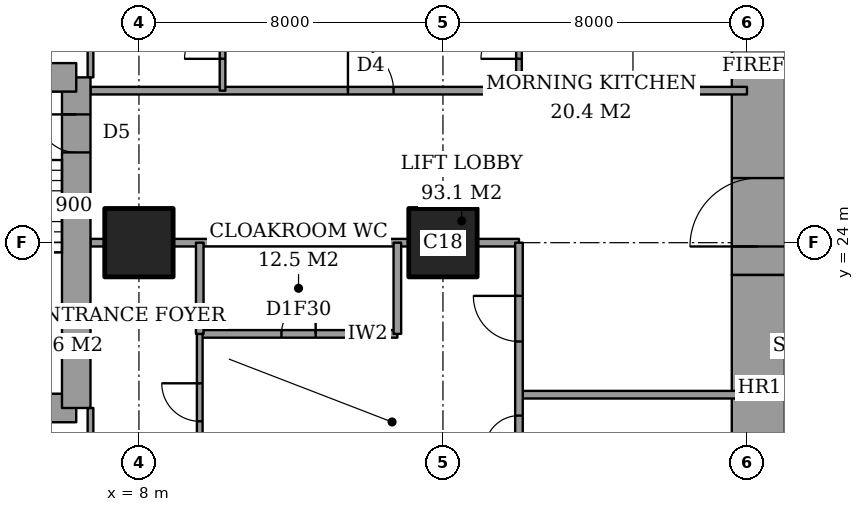
"""IFC4 building model, lengths in metres.
Left out: names, types, materials, properties, quantities, classifications, styles, units other than length and angle.
Written with IfcOpenShell. Run it as: python <this file> out.ifc"""

import sys

from ifc_helpers import new_model, si_unit, direction, frame, frame_2d, origin, origin_2d, place, context, subcontext, project, spatial, rectangle, extrude, element, fill, save


model = new_model("IFC4")
c1 = context("Model", 3, precision=1e-05, world=origin(), true_north=direction((0.0, 1.0)))
c2 = subcontext(c1, "Body", "Model", "MODEL_VIEW")
j1 = project(units=[si_unit("LENGTHUNIT", "METRE"), si_unit("PLANEANGLEUNIT", "RADIAN")], contexts=[c1])
p1 = place(None, origin())
s1 = spatial("IfcSite", under=j1, at=p1, CompositionType="ELEMENT")
p2 = place(p1, origin())
s2 = spatial("IfcBuilding", under=s1, at=p2, CompositionType="ELEMENT")
p3 = place(p2, frame((0.0, 0.0, 214.6)))
s3 = spatial("IfcBuildingStorey", under=s2, at=p3, CompositionType="ELEMENT", Elevation=214.6)
for number, where, z_axis, x_axis in (
    (1, (8.0, 24.0, 0.0), (0.0, 0.0, 1.0), (1.0, 0.0, 0.0)),
    (2, (16.0, 24.0, 0.0), (0.0, 0.0, 1.0), (1.0, 0.0, 0.0)),
):
    element("IfcColumn", number, at=place(p3, frame(where, z_axis=z_axis, x_axis=x_axis)), inside=s3, PredefinedType="COLUMN", context=c2, shape_type="SweptSolid", body=[
        extrude(rectangle(XDim=1.8, YDim=1.8, at=origin_2d()), origin(), (0.0, 0.0, 1.0), 3.6),
    ])
p4 = place(p3, frame((24.3, 13.0, 0.0), z_axis=(0.0, 0.0, 1.0), x_axis=(0.0, 1.0, 0.0)))
e3 = element("IfcWall", 3, at=p4, inside=s3, PredefinedType="SHEAR", context=c2, shape_type="SweptSolid", body=[
    extrude(rectangle(XDim=10.15, YDim=1.4, at=frame_2d((5.075, 0.0))), origin(), (0.0, 0.0, 1.0), 3.6),
])
p5 = place(p3, frame((24.3, 23.15, 0.0), z_axis=(0.0, 0.0, 1.0), x_axis=(0.0, 1.0, 0.0)))
e4 = element("IfcWall", 4, at=p5, inside=s3, PredefinedType="SHEAR", context=c2, shape_type="SweptSolid", body=[
    extrude(rectangle(XDim=11.85, YDim=1.4, at=frame_2d((5.925, 0.0))), origin(), (0.0, 0.0, 1.0), 3.6),
])
p6 = place(p5, frame((0.75, 0.0, 0.0)))
e5 = element("IfcOpeningElement", 5, at=p6, cuts=e4, PredefinedType="OPENING", context=c2, shape_type="SweptSolid", body=[
    extrude(rectangle(XDim=1.8, YDim=2.4, at=frame_2d((0.9, 1.2))), frame((0.0, 0.71, 0.0), z_axis=(0.0, -1.0, 0.0), x_axis=(1.0, 0.0, 0.0)), (0.0, 0.0, 1.0), 1.42),
])
p7 = place(p3, frame((1.9, 19.65, 0.0), z_axis=(0.0, 0.0, 1.0), x_axis=(1.0, 0.0, 0.0)))
e6 = element("IfcWall", 6, at=p7, inside=s3, PredefinedType="SHEAR", context=c2, shape_type="SweptSolid", body=[
    extrude(rectangle(XDim=4.45, YDim=0.75, at=frame_2d((2.225, 0.0))), origin(), (0.0, 0.0, 1.0), 3.6),
])
p8 = place(p3, frame((6.35, 19.65, 0.0), z_axis=(0.0, 0.0, 1.0), x_axis=(0.0, 1.0, 0.0)))
e7 = element("IfcWall", 7, at=p8, inside=s3, PredefinedType="SHEAR", context=c2, shape_type="SweptSolid", body=[
    extrude(rectangle(XDim=8.7, YDim=0.75, at=frame_2d((4.35, 0.0))), origin(), (0.0, 0.0, 1.0), 3.6),
])
p9 = place(p8, frame((6.725, 0.0, 0.0)))
e8 = element("IfcOpeningElement", 8, at=p9, cuts=e7, PredefinedType="OPENING", context=c2, shape_type="SweptSolid", body=[
    extrude(rectangle(XDim=1.0, YDim=2.1, at=frame_2d((0.5, 1.05))), frame((0.0, 0.385, 0.0), z_axis=(0.0, -1.0, 0.0), x_axis=(1.0, 0.0, 0.0)), (0.0, 0.0, 1.0), 0.77),
])
p10 = place(p3, frame((6.35, 28.35, 0.0), z_axis=(0.0, 0.0, 1.0), x_axis=(-1.0, 0.0, 0.0)))
e9 = element("IfcWall", 9, at=p10, inside=s3, PredefinedType="SHEAR", context=c2, shape_type="SweptSolid", body=[
    extrude(rectangle(XDim=4.45, YDim=0.75, at=frame_2d((2.225, 0.0))), origin(), (0.0, 0.0, 1.0), 3.6),
])
p11 = place(p3, frame((18.0, 20.0, 0.0), z_axis=(0.0, 0.0, 1.0), x_axis=(1.0, 0.0, 0.0)))
e10 = element("IfcWall", 10, at=p11, inside=s3, PredefinedType="PARTITIONING", context=c2, shape_type="SweptSolid", body=[
    extrude(rectangle(XDim=6.0, YDim=0.2, at=frame_2d((3.0, 0.0))), origin(), (0.0, 0.0, 1.0), 3.35),
])
p12 = place(p3, frame((9.6, 21.6, 0.0), z_axis=(0.0, 0.0, 1.0), x_axis=(1.0, 0.0, 0.0)))
e11 = element("IfcWall", 11, at=p12, inside=s3, PredefinedType="PARTITIONING", context=c2, shape_type="SweptSolid", body=[
    extrude(rectangle(XDim=5.2, YDim=0.2, at=frame_2d((2.6, 0.0))), origin(), (0.0, 0.0, 1.0), 3.35),
])
p13 = place(p12, frame((2.15, 0.0, 0.0)))
e12 = element("IfcOpeningElement", 12, at=p13, cuts=e11, PredefinedType="OPENING", context=c2, shape_type="SweptSolid", body=[
    extrude(rectangle(XDim=0.9, YDim=2.1, at=frame_2d((0.45, 1.05))), frame((0.0, 0.11, 0.0), z_axis=(0.0, -1.0, 0.0), x_axis=(1.0, 0.0, 0.0)), (0.0, 0.0, 1.0), 0.22),
])
p14 = place(p3, frame((6.725, 24.0, 0.0), z_axis=(0.0, 0.0, 1.0), x_axis=(1.0, 0.0, 0.0)))
e13 = element("IfcWall", 13, at=p14, inside=s3, PredefinedType="PARTITIONING", context=c2, shape_type="SweptSolid", body=[
    extrude(rectangle(XDim=0.375, YDim=0.2, at=frame_2d((0.188, 0.0))), origin(), (0.0, 0.0, 1.0), 3.35),
])
p15 = place(p3, frame((8.9, 24.0, 0.0), z_axis=(0.0, 0.0, 1.0), x_axis=(1.0, 0.0, 0.0)))
e14 = element("IfcWall", 14, at=p15, inside=s3, PredefinedType="PARTITIONING", context=c2, shape_type="SweptSolid", body=[
    extrude(rectangle(XDim=6.2, YDim=0.2, at=frame_2d((3.1, 0.0))), origin(), (0.0, 0.0, 1.0), 3.35),
])
p16 = place(p3, frame((16.9, 24.0, 0.0), z_axis=(0.0, 0.0, 1.0), x_axis=(1.0, 0.0, 0.0)))
e15 = element("IfcWall", 15, at=p16, inside=s3, PredefinedType="PARTITIONING", context=c2, shape_type="SweptSolid", body=[
    extrude(rectangle(XDim=1.1, YDim=0.2, at=frame_2d((0.55, 0.0))), origin(), (0.0, 0.0, 1.0), 3.35),
])
p17 = place(p3, frame((6.725, 28.0, 0.0), z_axis=(0.0, 0.0, 1.0), x_axis=(1.0, 0.0, 0.0)))
e16 = element("IfcWall", 16, at=p17, inside=s3, PredefinedType="PARTITIONING", context=c2, shape_type="SweptSolid", body=[
    extrude(rectangle(XDim=17.275, YDim=0.2, at=frame_2d((8.637, 0.0))), origin(), (0.0, 0.0, 1.0), 3.35),
])
p18 = place(p17, frame((6.775, 0.0, 0.0)))
e17 = element("IfcOpeningElement", 17, at=p18, cuts=e16, PredefinedType="OPENING", context=c2, shape_type="SweptSolid", body=[
    extrude(rectangle(XDim=1.2, YDim=2.4, at=frame_2d((0.6, 1.2))), frame((0.0, 0.11, 0.0), z_axis=(0.0, -1.0, 0.0), x_axis=(1.0, 0.0, 0.0)), (0.0, 0.0, 1.0), 0.22),
])
p19 = place(p3, frame((6.725, 17.2, 0.0), z_axis=(0.0, 0.0, 1.0), x_axis=(0.0, 1.0, 0.0)))
e18 = element("IfcWall", 18, at=p19, inside=s3, PredefinedType="PARTITIONING", context=c2, shape_type="SweptSolid", body=[
    extrude(rectangle(XDim=2.45, YDim=0.15, at=frame_2d((1.225, 0.0))), origin(), (0.0, 0.0, 1.0), 3.35),
])
p20 = place(p19, frame((0.587, 0.0, 0.0)))
e19 = element("IfcOpeningElement", 19, at=p20, cuts=e18, PredefinedType="OPENING", context=c2, shape_type="SweptSolid", body=[
    extrude(rectangle(XDim=0.9, YDim=2.1, at=frame_2d((0.45, 1.05))), frame((0.0, 0.085, 0.0), z_axis=(0.0, -1.0, 0.0), x_axis=(1.0, 0.0, 0.0)), (0.0, 0.0, 1.0), 0.17),
])
p21 = place(p3, frame((6.725, 28.35, 0.0), z_axis=(0.0, 0.0, 1.0), x_axis=(0.0, 1.0, 0.0)))
e20 = element("IfcWall", 20, at=p21, inside=s3, PredefinedType="PARTITIONING", context=c2, shape_type="SweptSolid", body=[
    extrude(rectangle(XDim=2.45, YDim=0.15, at=frame_2d((1.225, 0.0))), origin(), (0.0, 0.0, 1.0), 3.35),
])
p22 = place(p21, frame((0.962, 0.0, 0.0)))
e21 = element("IfcOpeningElement", 21, at=p22, cuts=e20, PredefinedType="OPENING", context=c2, shape_type="SweptSolid", body=[
    extrude(rectangle(XDim=0.9, YDim=2.1, at=frame_2d((0.45, 1.05))), frame((0.0, 0.085, 0.0), z_axis=(0.0, -1.0, 0.0), x_axis=(1.0, 0.0, 0.0)), (0.0, 0.0, 1.0), 0.17),
])
p23 = place(p3, frame((9.6, 21.6, 0.0), z_axis=(0.0, 0.0, 1.0), x_axis=(0.0, 1.0, 0.0)))
e22 = element("IfcWall", 22, at=p23, inside=s3, PredefinedType="PARTITIONING", context=c2, shape_type="SweptSolid", body=[
    extrude(rectangle(XDim=2.4, YDim=0.2, at=frame_2d((1.2, 0.0))), origin(), (0.0, 0.0, 1.0), 3.35),
])
p24 = place(p3, frame((9.6, 10.6, 0.0), z_axis=(0.0, 0.0, 1.0), x_axis=(0.0, 1.0, 0.0)))
e23 = element("IfcWall", 23, at=p24, inside=s3, PredefinedType="PARTITIONING", context=c2, shape_type="SweptSolid", body=[
    extrude(rectangle(XDim=11.0, YDim=0.15, at=frame_2d((5.5, 0.0))), origin(), (0.0, 0.0, 1.0), 3.35),
])
p25 = place(p24, frame((8.7, 0.0, 0.0)))
e24 = element("IfcOpeningElement", 24, at=p25, cuts=e23, PredefinedType="OPENING", context=c2, shape_type="SweptSolid", body=[
    extrude(rectangle(XDim=1.0, YDim=2.1, at=frame_2d((0.5, 1.05))), frame((0.0, 0.085, 0.0), z_axis=(0.0, -1.0, 0.0), x_axis=(1.0, 0.0, 0.0)), (0.0, 0.0, 1.0), 0.17),
])
p26 = place(p3, frame((10.2, 28.0, 0.0), z_axis=(0.0, 0.0, 1.0), x_axis=(0.0, 1.0, 0.0)))
e25 = element("IfcWall", 25, at=p26, inside=s3, PredefinedType="PARTITIONING", context=c2, shape_type="SweptSolid", body=[
    extrude(rectangle(XDim=9.4, YDim=0.15, at=frame_2d((4.7, 0.0))), origin(), (0.0, 0.0, 1.0), 3.35),
])
p27 = place(p26, frame((0.837, 0.0, 0.0)))
e26 = element("IfcOpeningElement", 26, at=p27, cuts=e25, PredefinedType="OPENING", context=c2, shape_type="SweptSolid", body=[
    extrude(rectangle(XDim=1.0, YDim=2.1, at=frame_2d((0.5, 1.05))), frame((0.0, 0.085, 0.0), z_axis=(0.0, -1.0, 0.0), x_axis=(1.0, 0.0, 0.0)), (0.0, 0.0, 1.0), 0.17),
])
p28 = place(p3, frame((14.8, 21.6, 0.0), z_axis=(0.0, 0.0, 1.0), x_axis=(0.0, 1.0, 0.0)))
e27 = element("IfcWall", 27, at=p28, inside=s3, PredefinedType="PARTITIONING", context=c2, shape_type="SweptSolid", body=[
    extrude(rectangle(XDim=2.4, YDim=0.2, at=frame_2d((1.2, 0.0))), origin(), (0.0, 0.0, 1.0), 3.35),
])
p29 = place(p3, frame((18.0, 18.0, 0.0), z_axis=(0.0, 0.0, 1.0), x_axis=(0.0, 1.0, 0.0)))
e28 = element("IfcWall", 28, at=p29, inside=s3, PredefinedType="PARTITIONING", context=c2, shape_type="SweptSolid", body=[
    extrude(rectangle(XDim=6.0, YDim=0.2, at=frame_2d((3.0, 0.0))), origin(), (0.0, 0.0, 1.0), 3.35),
])
p30 = place(p29, frame((3.4, 0.0, 0.0)))
e29 = element("IfcOpeningElement", 29, at=p30, cuts=e28, PredefinedType="OPENING", context=c2, shape_type="SweptSolid", body=[
    extrude(rectangle(XDim=1.2, YDim=2.4, at=frame_2d((0.6, 1.2))), frame((0.0, 0.11, 0.0), z_axis=(0.0, -1.0, 0.0), x_axis=(1.0, 0.0, 0.0)), (0.0, 0.0, 1.0), 0.22),
])
p31 = place(p29, frame((0.55, 0.0, 0.0)))
e30 = element("IfcOpeningElement", 30, at=p31, cuts=e28, PredefinedType="OPENING", context=c2, shape_type="SweptSolid", body=[
    extrude(rectangle(XDim=0.9, YDim=2.1, at=frame_2d((0.45, 1.05))), frame((0.0, 0.11, 0.0), z_axis=(0.0, -1.0, 0.0), x_axis=(1.0, 0.0, 0.0)), (0.0, 0.0, 1.0), 0.22),
])
p32 = place(p3, frame((18.0, 28.0, 0.0), z_axis=(0.0, 0.0, 1.0), x_axis=(0.0, 1.0, 0.0)))
e31 = element("IfcWall", 31, at=p32, inside=s3, PredefinedType="PARTITIONING", context=c2, shape_type="SweptSolid", body=[
    extrude(rectangle(XDim=9.4, YDim=0.15, at=frame_2d((4.7, 0.0))), origin(), (0.0, 0.0, 1.0), 3.35),
])
p33 = place(p32, frame((0.837, 0.0, 0.0)))
e32 = element("IfcOpeningElement", 32, at=p33, cuts=e31, PredefinedType="OPENING", context=c2, shape_type="SweptSolid", body=[
    extrude(rectangle(XDim=1.0, YDim=2.1, at=frame_2d((0.5, 1.05))), frame((0.0, 0.085, 0.0), z_axis=(0.0, -1.0, 0.0), x_axis=(1.0, 0.0, 0.0)), (0.0, 0.0, 1.0), 0.17),
])
p34 = place(p25, origin())
e33 = element("IfcDoor", 33, at=p34, inside=s3, OperationType="SINGLE_SWING_LEFT", PredefinedType="DOOR", context=c2, shape_type="SweptSolid", body=[
    extrude(rectangle(XDim=1.0, YDim=2.1, at=frame_2d((0.5, 1.05))), frame((0.0, 0.025, 0.0), z_axis=(0.0, -1.0, 0.0), x_axis=(1.0, 0.0, 0.0)), (0.0, 0.0, 1.0), 0.05),
])
fill(e24, e33)
p35 = place(p13, origin())
e34 = element("IfcDoor", 34, at=p35, inside=s3, OperationType="SINGLE_SWING_LEFT", PredefinedType="DOOR", context=c2, shape_type="SweptSolid", body=[
    extrude(rectangle(XDim=0.9, YDim=2.1, at=frame_2d((0.45, 1.05))), frame((0.0, 0.025, 0.0), z_axis=(0.0, -1.0, 0.0), x_axis=(1.0, 0.0, 0.0)), (0.0, 0.0, 1.0), 0.05),
])
fill(e12, e34)
p36 = place(p30, origin())
e35 = element("IfcDoor", 35, at=p36, inside=s3, OperationType="SINGLE_SWING_LEFT", PredefinedType="DOOR", context=c2, shape_type="SweptSolid", body=[
    extrude(rectangle(XDim=1.2, YDim=2.4, at=frame_2d((0.6, 1.2))), frame((0.0, 0.025, 0.0), z_axis=(0.0, -1.0, 0.0), x_axis=(1.0, 0.0, 0.0)), (0.0, 0.0, 1.0), 0.05),
])
fill(e29, e35)
p37 = place(p31, origin())
e36 = element("IfcDoor", 36, at=p37, inside=s3, OperationType="SINGLE_SWING_RIGHT", PredefinedType="DOOR", context=c2, shape_type="SweptSolid", body=[
    extrude(rectangle(XDim=0.9, YDim=2.1, at=frame_2d((0.45, 1.05))), frame((0.0, 0.025, 0.0), z_axis=(0.0, -1.0, 0.0), x_axis=(1.0, 0.0, 0.0)), (0.0, 0.0, 1.0), 0.05),
])
fill(e30, e36)
p38 = place(p27, origin())
e37 = element("IfcDoor", 37, at=p38, inside=s3, OperationType="SINGLE_SWING_RIGHT", PredefinedType="DOOR", context=c2, shape_type="SweptSolid", body=[
    extrude(rectangle(XDim=1.0, YDim=2.1, at=frame_2d((0.5, 1.05))), frame((0.0, 0.025, 0.0), z_axis=(0.0, -1.0, 0.0), x_axis=(1.0, 0.0, 0.0)), (0.0, 0.0, 1.0), 0.05),
])
fill(e26, e37)
p39 = place(p18, origin())
e38 = element("IfcDoor", 38, at=p39, inside=s3, OperationType="SINGLE_SWING_RIGHT", PredefinedType="DOOR", context=c2, shape_type="SweptSolid", body=[
    extrude(rectangle(XDim=1.2, YDim=2.4, at=frame_2d((0.6, 1.2))), frame((0.0, 0.025, 0.0), z_axis=(0.0, -1.0, 0.0), x_axis=(1.0, 0.0, 0.0)), (0.0, 0.0, 1.0), 0.05),
])
fill(e17, e38)
p40 = place(p33, origin())
e39 = element("IfcDoor", 39, at=p40, inside=s3, OperationType="SINGLE_SWING_RIGHT", PredefinedType="DOOR", context=c2, shape_type="SweptSolid", body=[
    extrude(rectangle(XDim=1.0, YDim=2.1, at=frame_2d((0.5, 1.05))), frame((0.0, 0.025, 0.0), z_axis=(0.0, -1.0, 0.0), x_axis=(1.0, 0.0, 0.0)), (0.0, 0.0, 1.0), 0.05),
])
fill(e32, e39)
p41 = place(p6, origin())
e40 = element("IfcDoor", 40, at=p41, inside=s3, OperationType="DOUBLE_DOOR_DOUBLE_SWING", PredefinedType="DOOR", context=c2, shape_type="SweptSolid", body=[
    extrude(rectangle(XDim=1.8, YDim=2.4, at=frame_2d((0.9, 1.2))), frame((0.0, 0.025, 0.0), z_axis=(0.0, -1.0, 0.0), x_axis=(1.0, 0.0, 0.0)), (0.0, 0.0, 1.0), 0.05),
])
fill(e5, e40)
p42 = place(p9, origin())
e41 = element("IfcDoor", 41, at=p42, inside=s3, OperationType="SINGLE_SWING_LEFT", PredefinedType="DOOR", context=c2, shape_type="SweptSolid", body=[
    extrude(rectangle(XDim=1.0, YDim=2.1, at=frame_2d((0.5, 1.05))), frame((0.0, 0.025, 0.0), z_axis=(0.0, -1.0, 0.0), x_axis=(1.0, 0.0, 0.0)), (0.0, 0.0, 1.0), 0.05),
])
fill(e8, e41)
save(model, sys.argv[1])
